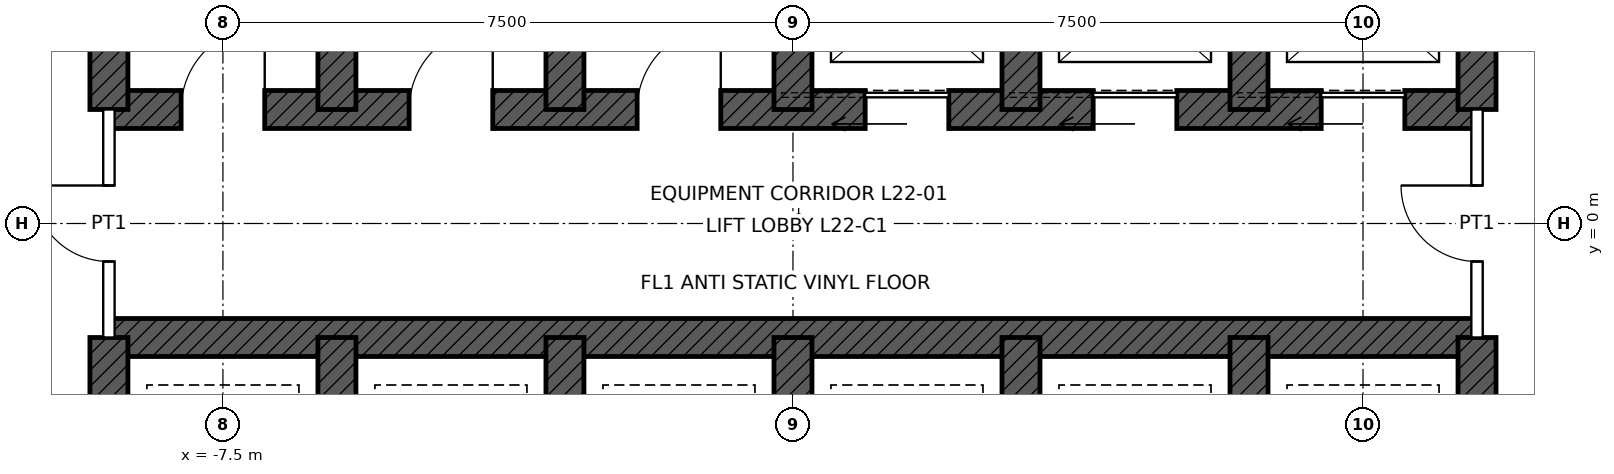
"""IFC4 building model, lengths in metres.
Left out: names, types, materials, properties, quantities, classifications, styles, units other than length and angle.
Written with IfcOpenShell. Run it as: python <this file> out.ifc"""

import sys

from ifc_helpers import new_model, si_unit, direction, frame, frame_2d, origin, place, context, subcontext, project, spatial, rectangle, extrude, element, fill, save


model = new_model("IFC4")
c1 = context("Model", 3, precision=1e-05, world=origin(), true_north=direction((0.0, 1.0)))
c2 = subcontext(c1, "Body", "Model", "MODEL_VIEW")
j1 = project(units=[si_unit("LENGTHUNIT", "METRE"), si_unit("PLANEANGLEUNIT", "RADIAN")], contexts=[c1])
p1 = place(None, origin())
s1 = spatial("IfcSite", under=j1, at=p1, CompositionType="ELEMENT")
p2 = place(p1, origin())
s2 = spatial("IfcBuilding", under=s1, at=p2, CompositionType="ELEMENT")
p3 = place(p2, frame((0.0, 0.0, 113.4)))
s3 = spatial("IfcBuildingStorey", under=s2, at=p3, CompositionType="ELEMENT", Elevation=113.4)
p4 = place(p3, frame((-9.0, 1.5, 0.0), z_axis=(0.0, 0.0, 1.0), x_axis=(1.0, 0.0, 0.0)))
e1 = element("IfcWall", 1, at=p4, inside=s3, PredefinedType="SHEAR", context=c2, shape_type="SweptSolid", body=[
    extrude(rectangle(XDim=18.0, YDim=0.5, at=frame_2d((9.0, 0.0))), origin(), (0.0, 0.0, 1.0), 4.5),
])
p5 = place(p4, frame((9.95, 0.0, 0.0)))
e2 = element("IfcOpeningElement", 2, at=p5, cuts=e1, PredefinedType="OPENING", context=c2, shape_type="SweptSolid", body=[
    extrude(rectangle(XDim=1.1, YDim=2.1, at=frame_2d((0.55, 1.05))), frame((0.0, 0.26, 0.0), z_axis=(0.0, -1.0, 0.0), x_axis=(1.0, 0.0, 0.0)), (0.0, 0.0, 1.0), 0.52),
])
p6 = place(p4, frame((12.95, 0.0, 0.0)))
e3 = element("IfcOpeningElement", 3, at=p6, cuts=e1, PredefinedType="OPENING", context=c2, shape_type="SweptSolid", body=[
    extrude(rectangle(XDim=1.1, YDim=2.1, at=frame_2d((0.55, 1.05))), frame((0.0, 0.26, 0.0), z_axis=(0.0, -1.0, 0.0), x_axis=(1.0, 0.0, 0.0)), (0.0, 0.0, 1.0), 0.52),
])
p7 = place(p4, frame((15.95, 0.0, 0.0)))
e4 = element("IfcOpeningElement", 4, at=p7, cuts=e1, PredefinedType="OPENING", context=c2, shape_type="SweptSolid", body=[
    extrude(rectangle(XDim=1.1, YDim=2.1, at=frame_2d((0.55, 1.05))), frame((0.0, 0.26, 0.0), z_axis=(0.0, -1.0, 0.0), x_axis=(1.0, 0.0, 0.0)), (0.0, 0.0, 1.0), 0.52),
])
p8 = place(p4, frame((0.95, 0.0, 0.0)))
e5 = element("IfcOpeningElement", 5, at=p8, cuts=e1, PredefinedType="OPENING", context=c2, shape_type="SweptSolid", body=[
    extrude(rectangle(XDim=1.1, YDim=2.1, at=frame_2d((0.55, 1.05))), frame((0.0, 0.26, 0.0), z_axis=(0.0, -1.0, 0.0), x_axis=(1.0, 0.0, 0.0)), (0.0, 0.0, 1.0), 0.52),
])
p9 = place(p4, frame((3.95, 0.0, 0.0)))
e6 = element("IfcOpeningElement", 6, at=p9, cuts=e1, PredefinedType="OPENING", context=c2, shape_type="SweptSolid", body=[
    extrude(rectangle(XDim=1.1, YDim=2.1, at=frame_2d((0.55, 1.05))), frame((0.0, 0.26, 0.0), z_axis=(0.0, -1.0, 0.0), x_axis=(1.0, 0.0, 0.0)), (0.0, 0.0, 1.0), 0.52),
])
p10 = place(p4, frame((6.95, 0.0, 0.0)))
e7 = element("IfcOpeningElement", 7, at=p10, cuts=e1, PredefinedType="OPENING", context=c2, shape_type="SweptSolid", body=[
    extrude(rectangle(XDim=1.1, YDim=2.1, at=frame_2d((0.55, 1.05))), frame((0.0, 0.26, 0.0), z_axis=(0.0, -1.0, 0.0), x_axis=(1.0, 0.0, 0.0)), (0.0, 0.0, 1.0), 0.52),
])
p11 = place(p3, frame((-9.0, -1.5, 0.0), z_axis=(0.0, 0.0, 1.0), x_axis=(1.0, 0.0, 0.0)))
e8 = element("IfcWall", 8, at=p11, inside=s3, PredefinedType="SHEAR", context=c2, shape_type="SweptSolid", body=[
    extrude(rectangle(XDim=18.0, YDim=0.5, at=frame_2d((9.0, 0.0))), origin(), (0.0, 0.0, 1.0), 4.5),
])
for number, where, z_axis, x_axis in (
    (9, (-9.0, 1.5, 0.0), (0.0, 0.0, 1.0), (0.0, 1.0, 0.0)),
    (10, (9.0, 1.5, 0.0), (0.0, 0.0, 1.0), (0.0, 1.0, 0.0)),
    (11, (-9.0, -4.5, 0.0), (0.0, 0.0, 1.0), (0.0, 1.0, 0.0)),
    (12, (9.0, -4.5, 0.0), (0.0, 0.0, 1.0), (0.0, 1.0, 0.0)),
    (13, (-6.0, 1.5, 0.0), (0.0, 0.0, 1.0), (0.0, 1.0, 0.0)),
    (14, (-3.0, 1.5, 0.0), (0.0, 0.0, 1.0), (0.0, 1.0, 0.0)),
    (15, (0.0, 1.5, 0.0), (0.0, 0.0, 1.0), (0.0, 1.0, 0.0)),
    (16, (3.0, 1.5, 0.0), (0.0, 0.0, 1.0), (0.0, 1.0, 0.0)),
    (17, (6.0, 1.5, 0.0), (0.0, 0.0, 1.0), (0.0, 1.0, 0.0)),
    (18, (-6.0, -4.5, 0.0), (0.0, 0.0, 1.0), (0.0, 1.0, 0.0)),
    (19, (-3.0, -4.5, 0.0), (0.0, 0.0, 1.0), (0.0, 1.0, 0.0)),
    (20, (0.0, -4.5, 0.0), (0.0, 0.0, 1.0), (0.0, 1.0, 0.0)),
    (21, (3.0, -4.5, 0.0), (0.0, 0.0, 1.0), (0.0, 1.0, 0.0)),
    (22, (6.0, -4.5, 0.0), (0.0, 0.0, 1.0), (0.0, 1.0, 0.0)),
):
    element("IfcWall", number, at=place(p3, frame(where, z_axis=z_axis, x_axis=x_axis)), inside=s3, PredefinedType="SHEAR", context=c2, shape_type="SweptSolid", body=[
        extrude(rectangle(XDim=3.0, YDim=0.5, at=frame_2d((1.5, 0.0))), origin(), (0.0, 0.0, 1.0), 4.5),
    ])
p12 = place(p3, frame((-9.0, -1.5, 0.0), z_axis=(0.0, 0.0, 1.0), x_axis=(0.0, 1.0, 0.0)))
e23 = element("IfcWall", 23, at=p12, inside=s3, PredefinedType="PARTITIONING", context=c2, shape_type="SweptSolid", body=[
    extrude(rectangle(XDim=3.0, YDim=0.15, at=frame_2d((1.5, 0.0))), origin(), (0.0, 0.0, 1.0), 4.25),
])
p13 = place(p12, frame((1.0, 0.0, 0.0)))
e24 = element("IfcOpeningElement", 24, at=p13, cuts=e23, PredefinedType="OPENING", context=c2, shape_type="SweptSolid", body=[
    extrude(rectangle(XDim=1.0, YDim=2.4, at=frame_2d((0.5, 1.2))), frame((0.0, 0.085, 0.0), z_axis=(0.0, -1.0, 0.0), x_axis=(1.0, 0.0, 0.0)), (0.0, 0.0, 1.0), 0.17),
])
p14 = place(p3, frame((9.0, -1.5, 0.0), z_axis=(0.0, 0.0, 1.0), x_axis=(0.0, 1.0, 0.0)))
e25 = element("IfcWall", 25, at=p14, inside=s3, PredefinedType="PARTITIONING", context=c2, shape_type="SweptSolid", body=[
    extrude(rectangle(XDim=3.0, YDim=0.15, at=frame_2d((1.5, 0.0))), origin(), (0.0, 0.0, 1.0), 4.25),
])
p15 = place(p14, frame((1.0, 0.0, 0.0)))
e26 = element("IfcOpeningElement", 26, at=p15, cuts=e25, PredefinedType="OPENING", context=c2, shape_type="SweptSolid", body=[
    extrude(rectangle(XDim=1.0, YDim=2.4, at=frame_2d((0.5, 1.2))), frame((0.0, 0.085, 0.0), z_axis=(0.0, -1.0, 0.0), x_axis=(1.0, 0.0, 0.0)), (0.0, 0.0, 1.0), 0.17),
])
p16 = place(p5, origin())
e27 = element("IfcDoor", 27, at=p16, inside=s3, OperationType="SLIDING_TO_LEFT", PredefinedType="DOOR", context=c2, shape_type="SweptSolid", body=[
    extrude(rectangle(XDim=1.1, YDim=2.1, at=frame_2d((0.55, 1.05))), frame((0.0, 0.025, 0.0), z_axis=(0.0, -1.0, 0.0), x_axis=(1.0, 0.0, 0.0)), (0.0, 0.0, 1.0), 0.05),
])
fill(e2, e27)
p17 = place(p6, origin())
e28 = element("IfcDoor", 28, at=p17, inside=s3, OperationType="SLIDING_TO_LEFT", PredefinedType="DOOR", context=c2, shape_type="SweptSolid", body=[
    extrude(rectangle(XDim=1.1, YDim=2.1, at=frame_2d((0.55, 1.05))), frame((0.0, 0.025, 0.0), z_axis=(0.0, -1.0, 0.0), x_axis=(1.0, 0.0, 0.0)), (0.0, 0.0, 1.0), 0.05),
])
fill(e3, e28)
p18 = place(p7, origin())
e29 = element("IfcDoor", 29, at=p18, inside=s3, OperationType="SLIDING_TO_LEFT", PredefinedType="DOOR", context=c2, shape_type="SweptSolid", body=[
    extrude(rectangle(XDim=1.1, YDim=2.1, at=frame_2d((0.55, 1.05))), frame((0.0, 0.025, 0.0), z_axis=(0.0, -1.0, 0.0), x_axis=(1.0, 0.0, 0.0)), (0.0, 0.0, 1.0), 0.05),
])
fill(e4, e29)
p19 = place(p13, origin())
e30 = element("IfcDoor", 30, at=p19, inside=s3, OperationType="SINGLE_SWING_RIGHT", PredefinedType="DOOR", context=c2, shape_type="SweptSolid", body=[
    extrude(rectangle(XDim=1.0, YDim=2.4, at=frame_2d((0.5, 1.2))), frame((0.0, 0.025, 0.0), z_axis=(0.0, -1.0, 0.0), x_axis=(1.0, 0.0, 0.0)), (0.0, 0.0, 1.0), 0.05),
])
fill(e24, e30)
p20 = place(p15, origin())
e31 = element("IfcDoor", 31, at=p20, inside=s3, OperationType="SINGLE_SWING_RIGHT", PredefinedType="DOOR", context=c2, shape_type="SweptSolid", body=[
    extrude(rectangle(XDim=1.0, YDim=2.4, at=frame_2d((0.5, 1.2))), frame((0.0, 0.025, 0.0), z_axis=(0.0, -1.0, 0.0), x_axis=(1.0, 0.0, 0.0)), (0.0, 0.0, 1.0), 0.05),
])
fill(e26, e31)
p21 = place(p8, origin())
e32 = element("IfcDoor", 32, at=p21, inside=s3, OperationType="SINGLE_SWING_RIGHT", PredefinedType="DOOR", context=c2, shape_type="SweptSolid", body=[
    extrude(rectangle(XDim=1.1, YDim=2.1, at=frame_2d((0.55, 1.05))), frame((0.0, 0.025, 0.0), z_axis=(0.0, -1.0, 0.0), x_axis=(1.0, 0.0, 0.0)), (0.0, 0.0, 1.0), 0.05),
])
fill(e5, e32)
p22 = place(p9, origin())
e33 = element("IfcDoor", 33, at=p22, inside=s3, OperationType="SINGLE_SWING_RIGHT", PredefinedType="DOOR", context=c2, shape_type="SweptSolid", body=[
    extrude(rectangle(XDim=1.1, YDim=2.1, at=frame_2d((0.55, 1.05))), frame((0.0, 0.025, 0.0), z_axis=(0.0, -1.0, 0.0), x_axis=(1.0, 0.0, 0.0)), (0.0, 0.0, 1.0), 0.05),
])
fill(e6, e33)
p23 = place(p10, origin())
e34 = element("IfcDoor", 34, at=p23, inside=s3, OperationType="SINGLE_SWING_RIGHT", PredefinedType="DOOR", context=c2, shape_type="SweptSolid", body=[
    extrude(rectangle(XDim=1.1, YDim=2.1, at=frame_2d((0.55, 1.05))), frame((0.0, 0.025, 0.0), z_axis=(0.0, -1.0, 0.0), x_axis=(1.0, 0.0, 0.0)), (0.0, 0.0, 1.0), 0.05),
])
fill(e7, e34)
save(model, sys.argv[1])
